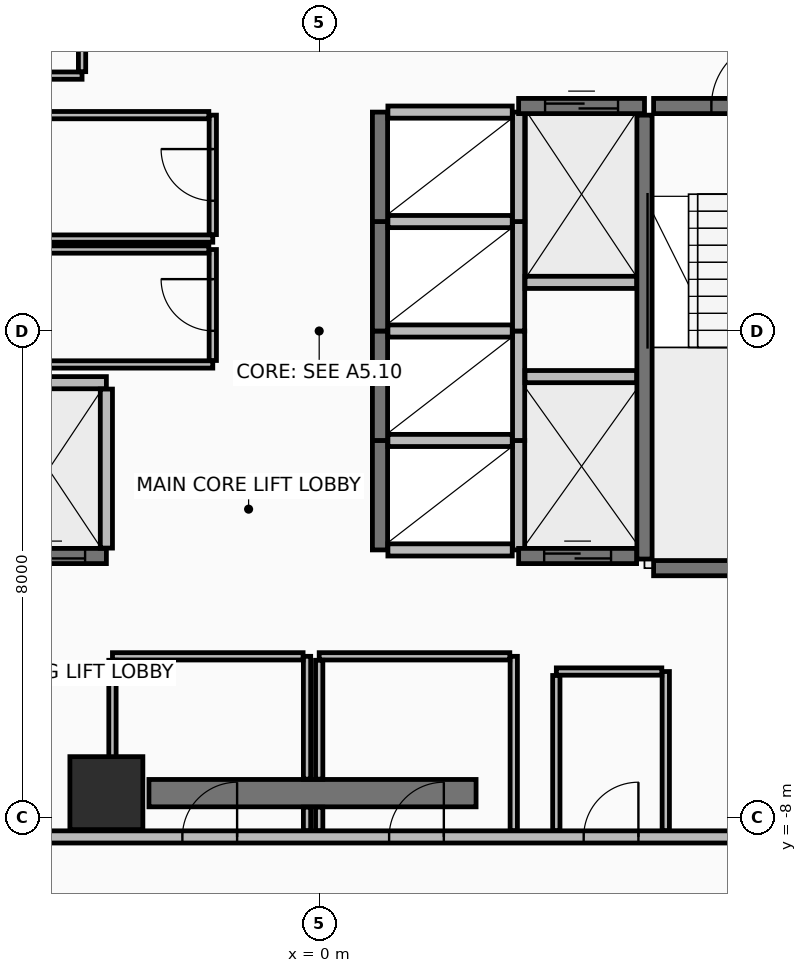
"""IFC4 building model, lengths in metres.
Left out: names, types, materials, properties, quantities, classifications, styles, units other than length and angle.
Written with IfcOpenShell. Run it as: python <this file> out.ifc"""

import sys

from ifc_helpers import new_model, si_unit, direction, frame, frame_2d, origin, origin_2d, place, context, subcontext, project, spatial, rectangle, extrude, element, fill, save


model = new_model("IFC4")
c1 = context("Model", 3, precision=1e-05, world=origin(), true_north=direction((0.0, 1.0)))
c2 = subcontext(c1, "Body", "Model", "MODEL_VIEW")
j1 = project(units=[si_unit("LENGTHUNIT", "METRE"), si_unit("PLANEANGLEUNIT", "RADIAN")], contexts=[c1])
p1 = place(None, origin())
s1 = spatial("IfcSite", under=j1, at=p1, CompositionType="ELEMENT")
p2 = place(p1, origin())
s2 = spatial("IfcBuilding", under=s1, at=p2, CompositionType="ELEMENT")
p3 = place(p2, frame((0.0, 0.0, 204.05)))
s3 = spatial("IfcBuildingStorey", under=s2, at=p3, CompositionType="ELEMENT", Elevation=204.05)
p4 = place(p3, frame((-3.5, -7.6, 0.0), z_axis=(0.0, 0.0, 1.0), x_axis=(1.0, 0.0, 0.0)))
e1 = element("IfcColumn", 1, at=p4, inside=s3, PredefinedType="COLUMN", context=c2, shape_type="SweptSolid", body=[
    extrude(rectangle(XDim=1.2, YDim=1.2, at=origin_2d()), origin(), (0.0, 0.0, 1.0), 3.6),
])
p5 = place(p3, frame((-2.8, -7.6, 0.0), z_axis=(0.0, 0.0, 1.0), x_axis=(1.0, 0.0, 0.0)))
e2 = element("IfcWall", 2, at=p5, inside=s3, PredefinedType="SHEAR", context=c2, shape_type="SweptSolid", body=[
    extrude(rectangle(XDim=5.38, YDim=0.45, at=frame_2d((2.69, 0.0))), origin(), (0.0, 0.0, 1.0), 3.42),
])
p6 = place(p3, frame((-9.62, -8.32, 0.0), z_axis=(0.0, 0.0, 1.0), x_axis=(1.0, 0.0, 0.0)))
e3 = element("IfcWall", 3, at=p6, inside=s3, PredefinedType="PARTITIONING", context=c2, shape_type="SweptSolid", body=[
    extrude(rectangle(XDim=19.24, YDim=0.2, at=frame_2d((9.62, 0.0))), origin(), (0.0, 0.0, 1.0), 2.865),
])
p7 = place(p6, frame((7.37, 0.0, 0.0)))
e4 = element("IfcOpeningElement", 4, at=p7, cuts=e3, PredefinedType="OPENING", context=c2, shape_type="SweptSolid", body=[
    extrude(rectangle(XDim=0.9, YDim=2.1, at=frame_2d((0.45, 1.05))), frame((0.0, 0.11, 0.0), z_axis=(0.0, -1.0, 0.0), x_axis=(1.0, 0.0, 0.0)), (0.0, 0.0, 1.0), 0.22),
])
p8 = place(p6, frame((10.77, 0.0, 0.0)))
e5 = element("IfcOpeningElement", 5, at=p8, cuts=e3, PredefinedType="OPENING", context=c2, shape_type="SweptSolid", body=[
    extrude(rectangle(XDim=0.9, YDim=2.1, at=frame_2d((0.45, 1.05))), frame((0.0, 0.11, 0.0), z_axis=(0.0, -1.0, 0.0), x_axis=(1.0, 0.0, 0.0)), (0.0, 0.0, 1.0), 0.22),
])
p9 = place(p6, frame((13.97, 0.0, 0.0)))
e6 = element("IfcOpeningElement", 6, at=p9, cuts=e3, PredefinedType="OPENING", context=c2, shape_type="SweptSolid", body=[
    extrude(rectangle(XDim=0.9, YDim=2.1, at=frame_2d((0.45, 1.05))), frame((0.0, 0.11, 0.0), z_axis=(0.0, -1.0, 0.0), x_axis=(1.0, 0.0, 0.0)), (0.0, 0.0, 1.0), 0.22),
])
p10 = place(p3, frame((5.35, -3.75, 0.0), z_axis=(0.0, 0.0, 1.0), x_axis=(0.0, 1.0, 0.0)))
e7 = element("IfcWall", 7, at=p10, inside=s3, PredefinedType="SHEAR", context=c2, shape_type="SweptSolid", body=[
    extrude(rectangle(XDim=7.3, YDim=0.25, at=frame_2d((3.65, 0.0))), origin(), (0.0, 0.0, 1.0), 3.42),
])
p11 = place(p3, frame((5.5, 3.7, 0.0), z_axis=(0.0, 0.0, 1.0), x_axis=(1.0, 0.0, 0.0)))
e8 = element("IfcWall", 8, at=p11, inside=s3, PredefinedType="SHEAR", context=c2, shape_type="SweptSolid", body=[
    extrude(rectangle(XDim=3.0, YDim=0.25, at=frame_2d((1.5, 0.0))), origin(), (0.0, 0.0, 1.0), 3.42),
])
p12 = place(p11, frame((0.95, 0.0, 0.0)))
e9 = element("IfcOpeningElement", 9, at=p12, cuts=e8, PredefinedType="OPENING", context=c2, shape_type="SweptSolid", body=[
    extrude(rectangle(XDim=1.1, YDim=2.15, at=frame_2d((0.55, 1.075))), frame((0.0, 0.135, 0.0), z_axis=(0.0, -1.0, 0.0), x_axis=(1.0, 0.0, 0.0)), (0.0, 0.0, 1.0), 0.27),
])
p13 = place(p3, frame((5.5, -3.9, 0.0), z_axis=(0.0, 0.0, 1.0), x_axis=(1.0, 0.0, 0.0)))
e10 = element("IfcWall", 10, at=p13, inside=s3, PredefinedType="SHEAR", context=c2, shape_type="SweptSolid", body=[
    extrude(rectangle(XDim=3.0, YDim=0.25, at=frame_2d((1.5, 0.0))), origin(), (0.0, 0.0, 1.0), 3.42),
])
p14 = place(p3, frame((1.0, -3.6, 0.0), z_axis=(0.0, 0.0, 1.0), x_axis=(0.0, 1.0, 0.0)))
e11 = element("IfcWall", 11, at=p14, inside=s3, PredefinedType="SHEAR", context=c2, shape_type="SweptSolid", body=[
    extrude(rectangle(XDim=1.8, YDim=0.25, at=frame_2d((0.9, 0.0))), origin(), (0.0, 0.0, 1.0), 3.42),
])
p15 = place(p3, frame((3.28, -3.6, 0.0), z_axis=(0.0, 0.0, 1.0), x_axis=(0.0, 1.0, 0.0)))
e12 = element("IfcWall", 12, at=p15, inside=s3, PredefinedType="PARTITIONING", context=c2, shape_type="SweptSolid", body=[
    extrude(rectangle(XDim=1.8, YDim=0.2, at=frame_2d((0.9, 0.0))), origin(), (0.0, 0.0, 1.0), 3.42),
])
for number, where, z_axis, x_axis in (
    (13, (1.13, -3.6, 0.0), (0.0, 0.0, 1.0), (1.0, 0.0, 0.0)),
    (14, (1.13, -1.8, 0.0), (0.0, 0.0, 1.0), (1.0, 0.0, 0.0)),
):
    element("IfcWall", number, at=place(p3, frame(where, z_axis=z_axis, x_axis=x_axis)), inside=s3, PredefinedType="PARTITIONING", context=c2, shape_type="SweptSolid", body=[
        extrude(rectangle(XDim=2.045, YDim=0.2, at=frame_2d((1.022, 0.0))), origin(), (0.0, 0.0, 1.0), 3.42),
    ])
p16 = place(p3, frame((1.0, -1.8, 0.0), z_axis=(0.0, 0.0, 1.0), x_axis=(0.0, 1.0, 0.0)))
e15 = element("IfcWall", 15, at=p16, inside=s3, PredefinedType="SHEAR", context=c2, shape_type="SweptSolid", body=[
    extrude(rectangle(XDim=1.8, YDim=0.25, at=frame_2d((0.9, 0.0))), origin(), (0.0, 0.0, 1.0), 3.42),
])
p17 = place(p3, frame((3.28, -1.8, 0.0), z_axis=(0.0, 0.0, 1.0), x_axis=(0.0, 1.0, 0.0)))
e16 = element("IfcWall", 16, at=p17, inside=s3, PredefinedType="PARTITIONING", context=c2, shape_type="SweptSolid", body=[
    extrude(rectangle(XDim=1.8, YDim=0.2, at=frame_2d((0.9, 0.0))), origin(), (0.0, 0.0, 1.0), 3.42),
])
p18 = place(p3, frame((1.13, 0.0, 0.0), z_axis=(0.0, 0.0, 1.0), x_axis=(1.0, 0.0, 0.0)))
e17 = element("IfcWall", 17, at=p18, inside=s3, PredefinedType="PARTITIONING", context=c2, shape_type="SweptSolid", body=[
    extrude(rectangle(XDim=2.045, YDim=0.2, at=frame_2d((1.022, 0.0))), origin(), (0.0, 0.0, 1.0), 3.42),
])
p19 = place(p3, frame((1.0, 0.0, 0.0), z_axis=(0.0, 0.0, 1.0), x_axis=(0.0, 1.0, 0.0)))
e18 = element("IfcWall", 18, at=p19, inside=s3, PredefinedType="SHEAR", context=c2, shape_type="SweptSolid", body=[
    extrude(rectangle(XDim=1.8, YDim=0.25, at=frame_2d((0.9, 0.0))), origin(), (0.0, 0.0, 1.0), 3.42),
])
p20 = place(p3, frame((3.28, 0.0, 0.0), z_axis=(0.0, 0.0, 1.0), x_axis=(0.0, 1.0, 0.0)))
e19 = element("IfcWall", 19, at=p20, inside=s3, PredefinedType="PARTITIONING", context=c2, shape_type="SweptSolid", body=[
    extrude(rectangle(XDim=1.8, YDim=0.2, at=frame_2d((0.9, 0.0))), origin(), (0.0, 0.0, 1.0), 3.42),
])
p21 = place(p3, frame((1.13, 1.8, 0.0), z_axis=(0.0, 0.0, 1.0), x_axis=(1.0, 0.0, 0.0)))
e20 = element("IfcWall", 20, at=p21, inside=s3, PredefinedType="PARTITIONING", context=c2, shape_type="SweptSolid", body=[
    extrude(rectangle(XDim=2.045, YDim=0.2, at=frame_2d((1.022, 0.0))), origin(), (0.0, 0.0, 1.0), 3.42),
])
p22 = place(p3, frame((1.0, 1.8, 0.0), z_axis=(0.0, 0.0, 1.0), x_axis=(0.0, 1.0, 0.0)))
e21 = element("IfcWall", 21, at=p22, inside=s3, PredefinedType="SHEAR", context=c2, shape_type="SweptSolid", body=[
    extrude(rectangle(XDim=1.8, YDim=0.25, at=frame_2d((0.9, 0.0))), origin(), (0.0, 0.0, 1.0), 3.42),
])
p23 = place(p3, frame((3.28, 1.8, 0.0), z_axis=(0.0, 0.0, 1.0), x_axis=(0.0, 1.0, 0.0)))
e22 = element("IfcWall", 22, at=p23, inside=s3, PredefinedType="PARTITIONING", context=c2, shape_type="SweptSolid", body=[
    extrude(rectangle(XDim=1.8, YDim=0.2, at=frame_2d((0.9, 0.0))), origin(), (0.0, 0.0, 1.0), 3.42),
])
p24 = place(p3, frame((1.13, 3.6, 0.0), z_axis=(0.0, 0.0, 1.0), x_axis=(1.0, 0.0, 0.0)))
e23 = element("IfcWall", 23, at=p24, inside=s3, PredefinedType="PARTITIONING", context=c2, shape_type="SweptSolid", body=[
    extrude(rectangle(XDim=2.045, YDim=0.2, at=frame_2d((1.022, 0.0))), origin(), (0.0, 0.0, 1.0), 2.715),
])
p25 = place(p3, frame((-5.4, -3.7, 0.0), z_axis=(0.0, 0.0, 1.0), x_axis=(1.0, 0.0, 0.0)))
e24 = element("IfcWall", 24, at=p25, inside=s3, PredefinedType="SHEAR", context=c2, shape_type="SweptSolid", body=[
    extrude(rectangle(XDim=1.9, YDim=0.25, at=frame_2d((0.95, 0.0))), origin(), (0.0, 0.0, 1.0), 3.42),
])
p26 = place(p25, frame((0.35, 0.0, 0.0)))
e25 = element("IfcOpeningElement", 25, at=p26, cuts=e24, PredefinedType="OPENING", context=c2, shape_type="SweptSolid", body=[
    extrude(rectangle(XDim=1.2, YDim=2.2, at=frame_2d((0.6, 1.1))), frame((0.0, 0.135, 0.0), z_axis=(0.0, -1.0, 0.0), x_axis=(1.0, 0.0, 0.0)), (0.0, 0.0, 1.0), 0.27),
])
p27 = place(p3, frame((-5.27, -0.85, 0.0), z_axis=(0.0, 0.0, 1.0), x_axis=(1.0, 0.0, 0.0)))
e26 = element("IfcWall", 26, at=p27, inside=s3, PredefinedType="PARTITIONING", context=c2, shape_type="SweptSolid", body=[
    extrude(rectangle(XDim=1.77, YDim=0.2, at=frame_2d((0.885, 0.0))), origin(), (0.0, 0.0, 1.0), 3.42),
])
p28 = place(p3, frame((-3.5, -3.57, 0.0), z_axis=(0.0, 0.0, 1.0), x_axis=(0.0, 1.0, 0.0)))
e27 = element("IfcWall", 27, at=p28, inside=s3, PredefinedType="PARTITIONING", context=c2, shape_type="SweptSolid", body=[
    extrude(rectangle(XDim=2.615, YDim=0.2, at=frame_2d((1.308, 0.0))), origin(), (0.0, 0.0, 1.0), 3.42),
])
p29 = place(p3, frame((3.28, 3.7, 0.0), z_axis=(0.0, 0.0, 1.0), x_axis=(1.0, 0.0, 0.0)))
e28 = element("IfcWall", 28, at=p29, inside=s3, PredefinedType="SHEAR", context=c2, shape_type="SweptSolid", body=[
    extrude(rectangle(XDim=2.07, YDim=0.25, at=frame_2d((1.035, 0.0))), origin(), (0.0, 0.0, 1.0), 3.42),
])
p30 = place(p29, frame((0.435, 0.0, 0.0)))
e29 = element("IfcOpeningElement", 29, at=p30, cuts=e28, PredefinedType="OPENING", context=c2, shape_type="SweptSolid", body=[
    extrude(rectangle(XDim=1.2, YDim=2.2, at=frame_2d((0.6, 1.1))), frame((0.0, 0.135, 0.0), z_axis=(0.0, -1.0, 0.0), x_axis=(1.0, 0.0, 0.0)), (0.0, 0.0, 1.0), 0.27),
])
p31 = place(p3, frame((3.385, 0.8, 0.0), z_axis=(0.0, 0.0, 1.0), x_axis=(1.0, 0.0, 0.0)))
e30 = element("IfcWall", 30, at=p31, inside=s3, PredefinedType="PARTITIONING", context=c2, shape_type="SweptSolid", body=[
    extrude(rectangle(XDim=1.835, YDim=0.2, at=frame_2d((0.917, 0.0))), origin(), (0.0, 0.0, 1.0), 3.42),
])
p32 = place(p3, frame((3.28, -3.7, 0.0), z_axis=(0.0, 0.0, 1.0), x_axis=(1.0, 0.0, 0.0)))
e31 = element("IfcWall", 31, at=p32, inside=s3, PredefinedType="SHEAR", context=c2, shape_type="SweptSolid", body=[
    extrude(rectangle(XDim=1.94, YDim=0.25, at=frame_2d((0.97, 0.0))), origin(), (0.0, 0.0, 1.0), 3.42),
])
p33 = place(p32, frame((0.42, 0.0, 0.0)))
e32 = element("IfcOpeningElement", 32, at=p33, cuts=e31, PredefinedType="OPENING", context=c2, shape_type="SweptSolid", body=[
    extrude(rectangle(XDim=1.1, YDim=2.2, at=frame_2d((0.55, 1.1))), frame((0.0, 0.135, 0.0), z_axis=(0.0, -1.0, 0.0), x_axis=(1.0, 0.0, 0.0)), (0.0, 0.0, 1.0), 0.27),
])
p34 = place(p3, frame((3.385, -0.75, 0.0), z_axis=(0.0, 0.0, 1.0), x_axis=(1.0, 0.0, 0.0)))
e33 = element("IfcWall", 33, at=p34, inside=s3, PredefinedType="PARTITIONING", context=c2, shape_type="SweptSolid", body=[
    extrude(rectangle(XDim=1.835, YDim=0.2, at=frame_2d((0.917, 0.0))), origin(), (0.0, 0.0, 1.0), 3.42),
])
p35 = place(p3, frame((-5.22, 1.52, 0.0), z_axis=(0.0, 0.0, 1.0), x_axis=(1.0, 0.0, 0.0)))
e34 = element("IfcWall", 34, at=p35, inside=s3, PredefinedType="PARTITIONING", context=c2, shape_type="SweptSolid", body=[
    extrude(rectangle(XDim=3.47, YDim=0.12, at=frame_2d((1.735, 0.0))), origin(), (0.0, 0.0, 1.0), 3.42),
])
p36 = place(p3, frame((-1.75, 1.585, 0.0), z_axis=(0.0, 0.0, 1.0), x_axis=(0.0, 1.0, 0.0)))
e35 = element("IfcWall", 35, at=p36, inside=s3, PredefinedType="PARTITIONING", context=c2, shape_type="SweptSolid", body=[
    extrude(rectangle(XDim=1.965, YDim=0.12, at=frame_2d((0.982, 0.0))), origin(), (0.0, 0.0, 1.0), 3.42),
])
p37 = place(p36, frame((0.557, 0.0, 0.0)))
e36 = element("IfcOpeningElement", 36, at=p37, cuts=e35, PredefinedType="OPENING", context=c2, shape_type="SweptSolid", body=[
    extrude(rectangle(XDim=0.85, YDim=2.1, at=frame_2d((0.425, 1.05))), frame((0.0, 0.07, 0.0), z_axis=(0.0, -1.0, 0.0), x_axis=(1.0, 0.0, 0.0)), (0.0, 0.0, 1.0), 0.14),
])
p38 = place(p3, frame((-1.815, 3.55, 0.0), z_axis=(0.0, 0.0, 1.0), x_axis=(-1.0, 0.0, 0.0)))
e37 = element("IfcWall", 37, at=p38, inside=s3, PredefinedType="PARTITIONING", context=c2, shape_type="SweptSolid", body=[
    extrude(rectangle(XDim=3.405, YDim=0.12, at=frame_2d((1.703, 0.0))), origin(), (0.0, 0.0, 1.0), 3.42),
])
p39 = place(p3, frame((-5.22, -0.55, 0.0), z_axis=(0.0, 0.0, 1.0), x_axis=(1.0, 0.0, 0.0)))
e38 = element("IfcWall", 38, at=p39, inside=s3, PredefinedType="PARTITIONING", context=c2, shape_type="SweptSolid", body=[
    extrude(rectangle(XDim=3.47, YDim=0.12, at=frame_2d((1.735, 0.0))), origin(), (0.0, 0.0, 1.0), 3.42),
])
p40 = place(p3, frame((-1.75, -0.485, 0.0), z_axis=(0.0, 0.0, 1.0), x_axis=(0.0, 1.0, 0.0)))
e39 = element("IfcWall", 39, at=p40, inside=s3, PredefinedType="PARTITIONING", context=c2, shape_type="SweptSolid", body=[
    extrude(rectangle(XDim=1.825, YDim=0.12, at=frame_2d((0.913, 0.0))), origin(), (0.0, 0.0, 1.0), 3.42),
])
p41 = place(p40, frame((0.488, 0.0, 0.0)))
e40 = element("IfcOpeningElement", 40, at=p41, cuts=e39, PredefinedType="OPENING", context=c2, shape_type="SweptSolid", body=[
    extrude(rectangle(XDim=0.85, YDim=2.1, at=frame_2d((0.425, 1.05))), frame((0.0, 0.07, 0.0), z_axis=(0.0, -1.0, 0.0), x_axis=(1.0, 0.0, 0.0)), (0.0, 0.0, 1.0), 0.14),
])
p42 = place(p3, frame((-1.815, 1.34, 0.0), z_axis=(0.0, 0.0, 1.0), x_axis=(-1.0, 0.0, 0.0)))
e41 = element("IfcWall", 41, at=p42, inside=s3, PredefinedType="PARTITIONING", context=c2, shape_type="SweptSolid", body=[
    extrude(rectangle(XDim=3.405, YDim=0.12, at=frame_2d((1.703, 0.0))), origin(), (0.0, 0.0, 1.0), 3.42),
])
p43 = place(p3, frame((-0.2, -8.215, 0.0), z_axis=(0.0, 0.0, 1.0), x_axis=(0.0, 1.0, 0.0)))
e42 = element("IfcWall", 42, at=p43, inside=s3, PredefinedType="PARTITIONING", context=c2, shape_type="SweptSolid", body=[
    extrude(rectangle(XDim=0.385, YDim=0.12, at=frame_2d((0.192, 0.0))), origin(), (0.0, 0.0, 1.0), 2.715),
])
p44 = place(p3, frame((-0.2, -7.37, 0.0), z_axis=(0.0, 0.0, 1.0), x_axis=(0.0, 1.0, 0.0)))
e43 = element("IfcWall", 43, at=p44, inside=s3, PredefinedType="PARTITIONING", context=c2, shape_type="SweptSolid", body=[
    extrude(rectangle(XDim=2.02, YDim=0.12, at=frame_2d((1.01, 0.0))), origin(), (0.0, 0.0, 1.0), 2.715),
])
p45 = place(p3, frame((-0.265, -5.35, 0.0), z_axis=(0.0, 0.0, 1.0), x_axis=(-1.0, 0.0, 0.0)))
e44 = element("IfcWall", 44, at=p45, inside=s3, PredefinedType="PARTITIONING", context=c2, shape_type="SweptSolid", body=[
    extrude(rectangle(XDim=3.135, YDim=0.12, at=frame_2d((1.567, 0.0))), origin(), (0.0, 0.0, 1.0), 2.715),
])
p46 = place(p3, frame((-3.4, -5.415, 0.0), z_axis=(0.0, 0.0, 1.0), x_axis=(0.0, -1.0, 0.0)))
e45 = element("IfcWall", 45, at=p46, inside=s3, PredefinedType="PARTITIONING", context=c2, shape_type="SweptSolid", body=[
    extrude(rectangle(XDim=2.8, YDim=0.12, at=frame_2d((1.4, 0.0))), origin(), (0.0, 0.0, 1.0), 2.715),
])
p47 = place(p3, frame((3.2, -8.215, 0.0), z_axis=(0.0, 0.0, 1.0), x_axis=(0.0, 1.0, 0.0)))
e46 = element("IfcWall", 46, at=p47, inside=s3, PredefinedType="PARTITIONING", context=c2, shape_type="SweptSolid", body=[
    extrude(rectangle(XDim=2.865, YDim=0.12, at=frame_2d((1.433, 0.0))), origin(), (0.0, 0.0, 1.0), 2.715),
])
p48 = place(p3, frame((3.135, -5.35, 0.0), z_axis=(0.0, 0.0, 1.0), x_axis=(-1.0, 0.0, 0.0)))
e47 = element("IfcWall", 47, at=p48, inside=s3, PredefinedType="PARTITIONING", context=c2, shape_type="SweptSolid", body=[
    extrude(rectangle(XDim=3.135, YDim=0.12, at=frame_2d((1.567, 0.0))), origin(), (0.0, 0.0, 1.0), 3.42),
])
p49 = place(p3, frame((0.0, -5.415, 0.0), z_axis=(0.0, 0.0, 1.0), x_axis=(0.0, -1.0, 0.0)))
e48 = element("IfcWall", 48, at=p49, inside=s3, PredefinedType="PARTITIONING", context=c2, shape_type="SweptSolid", body=[
    extrude(rectangle(XDim=1.955, YDim=0.12, at=frame_2d((0.978, 0.0))), origin(), (0.0, 0.0, 1.0), 2.715),
])
p50 = place(p3, frame((0.0, -7.83, 0.0), z_axis=(0.0, 0.0, 1.0), x_axis=(0.0, -1.0, 0.0)))
e49 = element("IfcWall", 49, at=p50, inside=s3, PredefinedType="PARTITIONING", context=c2, shape_type="SweptSolid", body=[
    extrude(rectangle(XDim=0.385, YDim=0.12, at=frame_2d((0.192, 0.0))), origin(), (0.0, 0.0, 1.0), 2.715),
])
p51 = place(p3, frame((-6.35, 4.2, 0.0), z_axis=(0.0, 0.0, 1.0), x_axis=(1.0, 0.0, 0.0)))
e50 = element("IfcWall", 50, at=p51, inside=s3, PredefinedType="PARTITIONING", context=c2, shape_type="SweptSolid", body=[
    extrude(rectangle(XDim=2.45, YDim=0.12, at=frame_2d((1.225, 0.0))), origin(), (0.0, 0.0, 1.0), 3.42),
])
p52 = place(p3, frame((-3.9, 4.265, 0.0), z_axis=(0.0, 0.0, 1.0), x_axis=(0.0, 1.0, 0.0)))
e51 = element("IfcWall", 51, at=p52, inside=s3, PredefinedType="PARTITIONING", context=c2, shape_type="SweptSolid", body=[
    extrude(rectangle(XDim=3.95, YDim=0.12, at=frame_2d((1.975, 0.0))), origin(), (0.0, 0.0, 1.0), 2.715),
])
p53 = place(p3, frame((5.7, -8.215, 0.0), z_axis=(0.0, 0.0, 1.0), x_axis=(0.0, 1.0, 0.0)))
e52 = element("IfcWall", 52, at=p53, inside=s3, PredefinedType="PARTITIONING", context=c2, shape_type="SweptSolid", body=[
    extrude(rectangle(XDim=2.615, YDim=0.12, at=frame_2d((1.308, 0.0))), origin(), (0.0, 0.0, 1.0), 2.715),
])
p54 = place(p3, frame((5.635, -5.6, 0.0), z_axis=(0.0, 0.0, 1.0), x_axis=(-1.0, 0.0, 0.0)))
e53 = element("IfcWall", 53, at=p54, inside=s3, PredefinedType="PARTITIONING", context=c2, shape_type="SweptSolid", body=[
    extrude(rectangle(XDim=1.735, YDim=0.12, at=frame_2d((0.868, 0.0))), origin(), (0.0, 0.0, 1.0), 3.42),
])
p55 = place(p3, frame((3.9, -5.665, 0.0), z_axis=(0.0, 0.0, 1.0), x_axis=(0.0, -1.0, 0.0)))
e54 = element("IfcWall", 54, at=p55, inside=s3, PredefinedType="PARTITIONING", context=c2, shape_type="SweptSolid", body=[
    extrude(rectangle(XDim=2.55, YDim=0.12, at=frame_2d((1.275, 0.0))), origin(), (0.0, 0.0, 1.0), 2.715),
])
p56 = place(p12, frame((1.1, 0.0, 0.0), z_axis=(0.0, 0.0, 1.0), x_axis=(-1.0, 0.0, 0.0)))
e55 = element("IfcDoor", 55, at=p56, inside=s3, OperationType="SINGLE_SWING_LEFT", PredefinedType="DOOR", context=c2, shape_type="SweptSolid", body=[
    extrude(rectangle(XDim=1.1, YDim=2.15, at=frame_2d((0.55, 1.075))), frame((0.0, 0.025, 0.0), z_axis=(0.0, -1.0, 0.0), x_axis=(1.0, 0.0, 0.0)), (0.0, 0.0, 1.0), 0.05),
])
fill(e9, e55)
p57 = place(p26, origin())
e56 = element("IfcDoor", 56, at=p57, inside=s3, OperationType="SLIDING_TO_RIGHT", PredefinedType="DOOR", context=c2, shape_type="SweptSolid", body=[
    extrude(rectangle(XDim=1.2, YDim=2.2, at=frame_2d((0.6, 1.1))), frame((0.0, 0.025, 0.0), z_axis=(0.0, -1.0, 0.0), x_axis=(1.0, 0.0, 0.0)), (0.0, 0.0, 1.0), 0.05),
])
fill(e25, e56)
p58 = place(p30, origin())
e57 = element("IfcDoor", 57, at=p58, inside=s3, OperationType="SLIDING_TO_RIGHT", PredefinedType="DOOR", context=c2, shape_type="SweptSolid", body=[
    extrude(rectangle(XDim=1.2, YDim=2.2, at=frame_2d((0.6, 1.1))), frame((0.0, 0.025, 0.0), z_axis=(0.0, -1.0, 0.0), x_axis=(1.0, 0.0, 0.0)), (0.0, 0.0, 1.0), 0.05),
])
fill(e29, e57)
p59 = place(p33, origin())
e58 = element("IfcDoor", 58, at=p59, inside=s3, OperationType="SLIDING_TO_LEFT", PredefinedType="DOOR", context=c2, shape_type="SweptSolid", body=[
    extrude(rectangle(XDim=1.1, YDim=2.2, at=frame_2d((0.55, 1.1))), frame((0.0, 0.025, 0.0), z_axis=(0.0, -1.0, 0.0), x_axis=(1.0, 0.0, 0.0)), (0.0, 0.0, 1.0), 0.05),
])
fill(e32, e58)
p60 = place(p37, frame((0.85, 0.0, 0.0), z_axis=(0.0, 0.0, 1.0), x_axis=(-1.0, 0.0, 0.0)))
e59 = element("IfcDoor", 59, at=p60, inside=s3, OperationType="SINGLE_SWING_RIGHT", PredefinedType="DOOR", context=c2, shape_type="SweptSolid", body=[
    extrude(rectangle(XDim=0.85, YDim=2.1, at=frame_2d((0.425, 1.05))), frame((0.0, 0.025, 0.0), z_axis=(0.0, -1.0, 0.0), x_axis=(1.0, 0.0, 0.0)), (0.0, 0.0, 1.0), 0.05),
])
fill(e36, e59)
p61 = place(p41, frame((0.85, 0.0, 0.0), z_axis=(0.0, 0.0, 1.0), x_axis=(-1.0, 0.0, 0.0)))
e60 = element("IfcDoor", 60, at=p61, inside=s3, OperationType="SINGLE_SWING_RIGHT", PredefinedType="DOOR", context=c2, shape_type="SweptSolid", body=[
    extrude(rectangle(XDim=0.85, YDim=2.1, at=frame_2d((0.425, 1.05))), frame((0.0, 0.025, 0.0), z_axis=(0.0, -1.0, 0.0), x_axis=(1.0, 0.0, 0.0)), (0.0, 0.0, 1.0), 0.05),
])
fill(e40, e60)
p62 = place(p7, frame((0.9, 0.0, 0.0), z_axis=(0.0, 0.0, 1.0), x_axis=(-1.0, 0.0, 0.0)))
e61 = element("IfcDoor", 61, at=p62, inside=s3, OperationType="SINGLE_SWING_LEFT", PredefinedType="DOOR", context=c2, shape_type="SweptSolid", body=[
    extrude(rectangle(XDim=0.9, YDim=2.1, at=frame_2d((0.45, 1.05))), frame((0.0, 0.025, 0.0), z_axis=(0.0, -1.0, 0.0), x_axis=(1.0, 0.0, 0.0)), (0.0, 0.0, 1.0), 0.05),
])
fill(e4, e61)
p63 = place(p8, frame((0.9, 0.0, 0.0), z_axis=(0.0, 0.0, 1.0), x_axis=(-1.0, 0.0, 0.0)))
e62 = element("IfcDoor", 62, at=p63, inside=s3, OperationType="SINGLE_SWING_LEFT", PredefinedType="DOOR", context=c2, shape_type="SweptSolid", body=[
    extrude(rectangle(XDim=0.9, YDim=2.1, at=frame_2d((0.45, 1.05))), frame((0.0, 0.025, 0.0), z_axis=(0.0, -1.0, 0.0), x_axis=(1.0, 0.0, 0.0)), (0.0, 0.0, 1.0), 0.05),
])
fill(e5, e62)
p64 = place(p9, frame((0.9, 0.0, 0.0), z_axis=(0.0, 0.0, 1.0), x_axis=(-1.0, 0.0, 0.0)))
e63 = element("IfcDoor", 63, at=p64, inside=s3, OperationType="SINGLE_SWING_LEFT", PredefinedType="DOOR", context=c2, shape_type="SweptSolid", body=[
    extrude(rectangle(XDim=0.9, YDim=2.1, at=frame_2d((0.45, 1.05))), frame((0.0, 0.025, 0.0), z_axis=(0.0, -1.0, 0.0), x_axis=(1.0, 0.0, 0.0)), (0.0, 0.0, 1.0), 0.05),
])
fill(e6, e63)
save(model, sys.argv[1])
